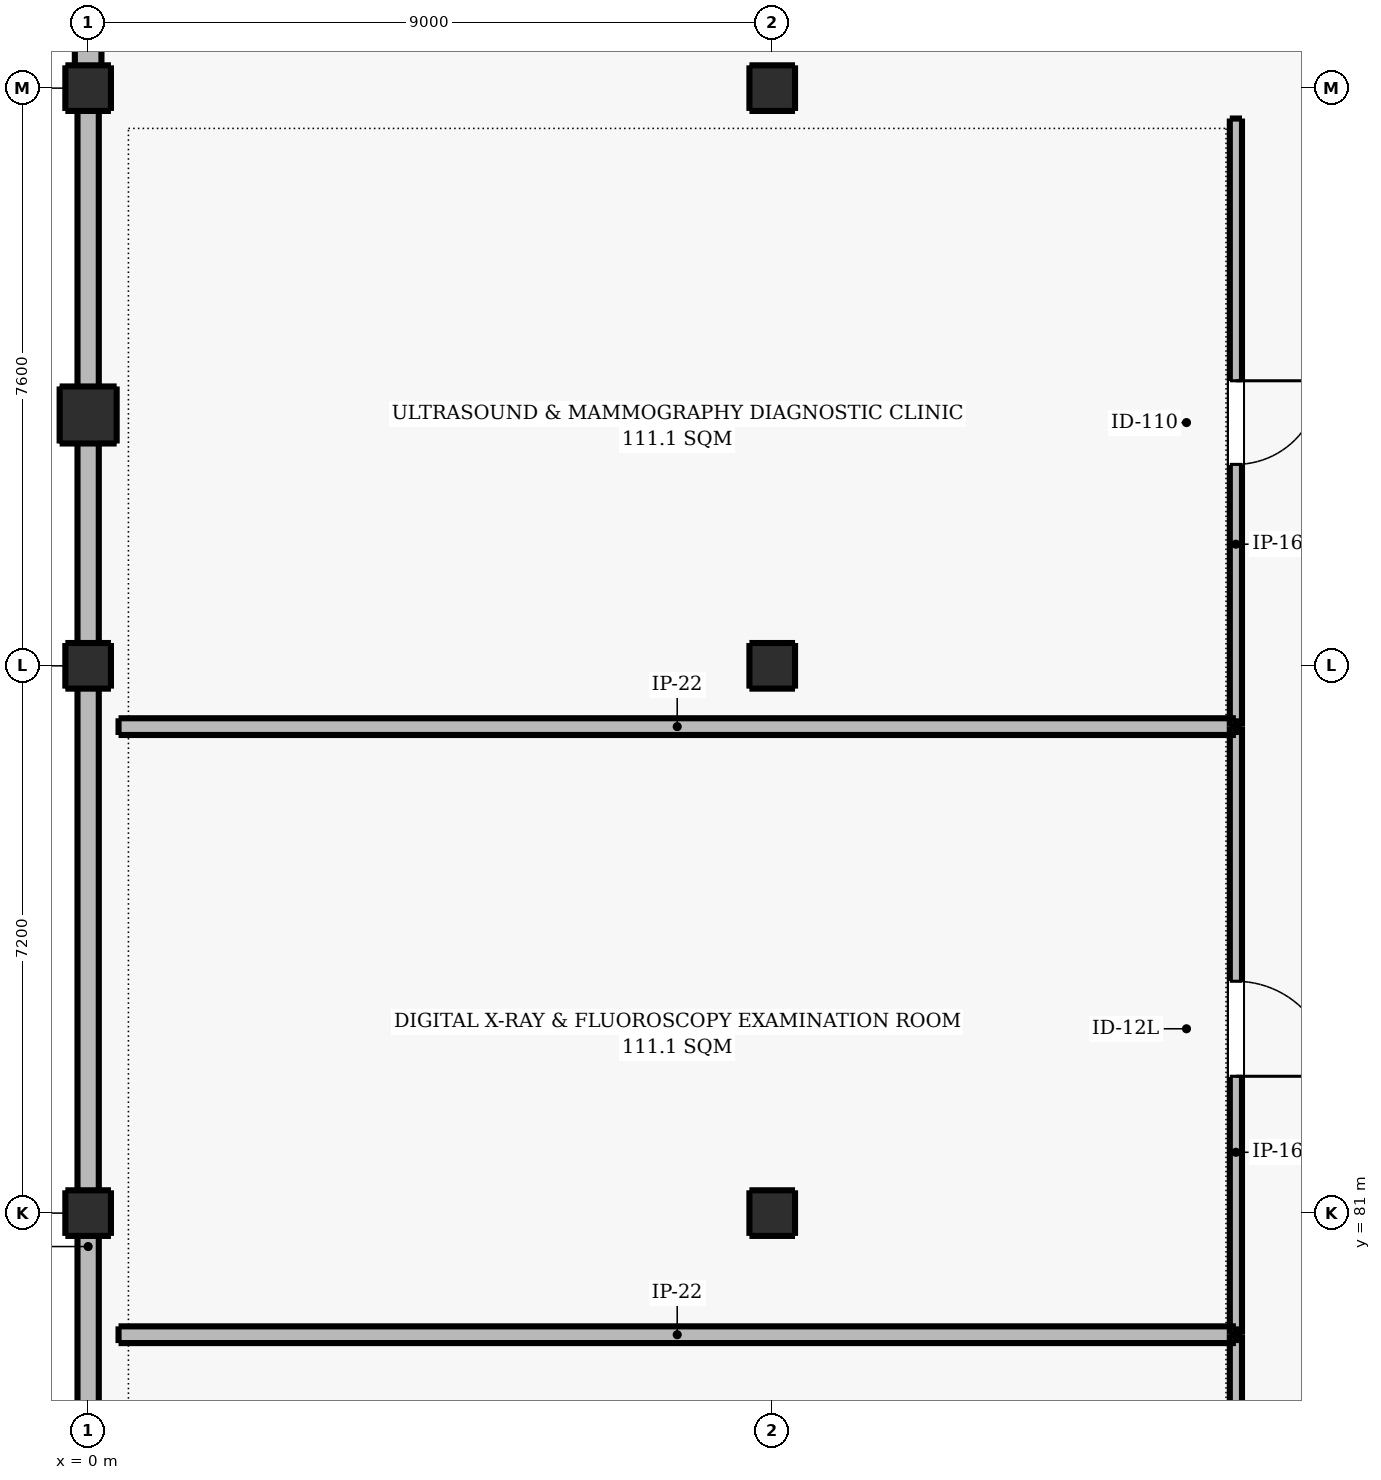
"""IFC4 building model, lengths in metres.
Left out: names, types, materials, properties, quantities, classifications, styles, units other than length and angle.
Written with IfcOpenShell. Run it as: python <this file> out.ifc"""

import sys

from ifc_helpers import new_model, si_unit, direction, frame, frame_2d, origin, origin_2d, place, context, subcontext, project, spatial, rectangle, extrude, element, fill, save


model = new_model("IFC4")
c1 = context("Model", 3, precision=1e-05, world=origin(), true_north=direction((0.0, 1.0)))
c2 = subcontext(c1, "Body", "Model", "MODEL_VIEW")
j1 = project(units=[si_unit("LENGTHUNIT", "METRE"), si_unit("PLANEANGLEUNIT", "RADIAN")], contexts=[c1])
p1 = place(None, origin())
s1 = spatial("IfcSite", under=j1, at=p1, CompositionType="ELEMENT")
p2 = place(p1, origin())
s2 = spatial("IfcBuilding", under=s1, at=p2, CompositionType="ELEMENT")
p3 = place(p2, origin())
s3 = spatial("IfcBuildingStorey", under=s2, at=p3, CompositionType="ELEMENT", Elevation=0.0)
for number, where, z_axis, x_axis in (
    (1, (0.0, 81.0, 0.0), (0.0, 0.0, 1.0), (1.0, 0.0, 0.0)),
    (2, (0.0, 88.2, 0.0), (0.0, 0.0, 1.0), (1.0, 0.0, 0.0)),
):
    element("IfcColumn", number, at=place(p3, frame(where, z_axis=z_axis, x_axis=x_axis)), inside=s3, PredefinedType="COLUMN", context=c2, shape_type="SweptSolid", body=[
        extrude(rectangle(XDim=0.6, YDim=0.6, at=origin_2d()), origin(), (0.0, 0.0, 1.0), 5.1),
    ])
p4 = place(p3, frame((0.0, 91.5, 0.0), z_axis=(0.0, 0.0, 1.0), x_axis=(1.0, 0.0, 0.0)))
e3 = element("IfcColumn", 3, at=p4, inside=s3, PredefinedType="PILASTER", context=c2, shape_type="SweptSolid", body=[
    extrude(rectangle(XDim=0.75, YDim=0.75, at=origin_2d()), origin(), (0.0, 0.0, 1.0), 5.1),
])
for number, where, z_axis, x_axis in (
    (4, (0.0, 95.8, 0.0), (0.0, 0.0, 1.0), (1.0, 0.0, 0.0)),
    (5, (9.0, 81.0, 0.0), (0.0, 0.0, 1.0), (1.0, 0.0, 0.0)),
    (6, (9.0, 88.2, 0.0), (0.0, 0.0, 1.0), (1.0, 0.0, 0.0)),
    (7, (9.0, 95.8, 0.0), (0.0, 0.0, 1.0), (1.0, 0.0, 0.0)),
):
    element("IfcColumn", number, at=place(p3, frame(where, z_axis=z_axis, x_axis=x_axis)), inside=s3, PredefinedType="COLUMN", context=c2, shape_type="SweptSolid", body=[
        extrude(rectangle(XDim=0.6, YDim=0.6, at=origin_2d()), origin(), (0.0, 0.0, 1.0), 5.1),
    ])
p5 = place(p3, frame((0.0, 45.0, 0.0), z_axis=(0.0, 0.0, 1.0), x_axis=(0.0, 1.0, 0.0)))
e8 = element("IfcWall", 8, at=p5, inside=s3, PredefinedType="SOLIDWALL", context=c2, shape_type="SweptSolid", body=[
    extrude(rectangle(XDim=50.8, YDim=0.28, at=frame_2d((25.4, 0.0))), origin(), (0.0, 0.0, 1.0), 4.16),
])
p6 = place(p5, frame((2.3, 0.0, 0.0)))
e9 = element("IfcOpeningElement", 9, at=p6, cuts=e8, PredefinedType="OPENING", context=c2, shape_type="SweptSolid", body=[
    extrude(rectangle(XDim=2.6, YDim=2.6, at=frame_2d((1.3, 1.3))), frame((0.0, 0.15, 0.0), z_axis=(0.0, -1.0, 0.0), x_axis=(1.0, 0.0, 0.0)), (0.0, 0.0, 1.0), 0.3),
])
p7 = place(p3, frame((0.0, 95.8, 0.0), z_axis=(0.0, 0.0, 1.0), x_axis=(0.0, 1.0, 0.0)))
e10 = element("IfcWall", 10, at=p7, inside=s3, PredefinedType="SOLIDWALL", context=c2, shape_type="SweptSolid", body=[
    extrude(rectangle(XDim=15.2, YDim=0.35, at=frame_2d((7.6, 0.0))), origin(), (0.0, 0.0, 1.0), 4.16),
])
p8 = place(p7, frame((0.8, 0.0, 0.0)))
e11 = element("IfcOpeningElement", 11, at=p8, cuts=e10, PredefinedType="OPENING", context=c2, shape_type="SweptSolid", body=[
    extrude(rectangle(XDim=2.4, YDim=2.5, at=frame_2d((1.2, 1.25))), frame((0.0, 0.185, 0.0), z_axis=(0.0, -1.0, 0.0), x_axis=(1.0, 0.0, 0.0)), (0.0, 0.0, 1.0), 0.37),
])
p9 = place(p7, frame((11.667, 0.0, 1.05)))
e12 = element("IfcOpeningElement", 12, at=p9, cuts=e10, PredefinedType="OPENING", context=c2, shape_type="SweptSolid", body=[
    extrude(rectangle(XDim=2.0, YDim=2.1, at=frame_2d((1.0, 1.05))), frame((0.0, 0.185, 0.0), z_axis=(0.0, -1.0, 0.0), x_axis=(1.0, 0.0, 0.0)), (0.0, 0.0, 1.0), 0.37),
])
p10 = place(p3, frame((15.1, 70.9, 0.0), z_axis=(0.0, 0.0, 1.0), x_axis=(0.0, 1.0, 0.0)))
e13 = element("IfcWall", 13, at=p10, inside=s3, PredefinedType="PARTITIONING", context=c2, shape_type="SweptSolid", body=[
    extrude(rectangle(XDim=8.5, YDim=0.16, at=frame_2d((4.25, 0.0))), origin(), (0.0, 0.0, 1.0), 4.49),
])
p11 = place(p10, frame((3.65, 0.0, 0.0)))
e14 = element("IfcOpeningElement", 14, at=p11, cuts=e13, PredefinedType="OPENING", context=c2, shape_type="SweptSolid", body=[
    extrude(rectangle(XDim=1.25, YDim=2.2, at=frame_2d((0.625, 1.1))), frame((0.0, 0.09, 0.0), z_axis=(0.0, -1.0, 0.0), x_axis=(1.0, 0.0, 0.0)), (0.0, 0.0, 1.0), 0.18),
])
p12 = place(p3, frame((0.4, 79.4, 0.0), z_axis=(0.0, 0.0, 1.0), x_axis=(1.0, 0.0, 0.0)))
e15 = element("IfcWall", 15, at=p12, inside=s3, PredefinedType="PARTITIONING", context=c2, shape_type="SweptSolid", body=[
    extrude(rectangle(XDim=14.7, YDim=0.22, at=frame_2d((7.35, 0.0))), origin(), (0.0, 0.0, 1.0), 4.82),
])
p13 = place(p3, frame((15.1, 79.4, 0.0), z_axis=(0.0, 0.0, 1.0), x_axis=(0.0, 1.0, 0.0)))
e16 = element("IfcWall", 16, at=p13, inside=s3, PredefinedType="PARTITIONING", context=c2, shape_type="SweptSolid", body=[
    extrude(rectangle(XDim=8.0, YDim=0.16, at=frame_2d((4.0, 0.0))), origin(), (0.0, 0.0, 1.0), 4.36),
])
p14 = place(p13, frame((3.4, 0.0, 0.0)))
e17 = element("IfcOpeningElement", 17, at=p14, cuts=e16, PredefinedType="OPENING", context=c2, shape_type="SweptSolid", body=[
    extrude(rectangle(XDim=1.25, YDim=2.2, at=frame_2d((0.625, 1.1))), frame((0.0, 0.09, 0.0), z_axis=(0.0, -1.0, 0.0), x_axis=(1.0, 0.0, 0.0)), (0.0, 0.0, 1.0), 0.18),
])
p15 = place(p3, frame((0.4, 87.4, 0.0), z_axis=(0.0, 0.0, 1.0), x_axis=(1.0, 0.0, 0.0)))
e18 = element("IfcWall", 18, at=p15, inside=s3, PredefinedType="PARTITIONING", context=c2, shape_type="SweptSolid", body=[
    extrude(rectangle(XDim=14.7, YDim=0.22, at=frame_2d((7.35, 0.0))), origin(), (0.0, 0.0, 1.0), 4.82),
])
p16 = place(p3, frame((15.1, 87.4, 0.0), z_axis=(0.0, 0.0, 1.0), x_axis=(0.0, 1.0, 0.0)))
e19 = element("IfcWall", 19, at=p16, inside=s3, PredefinedType="PARTITIONING", context=c2, shape_type="SweptSolid", body=[
    extrude(rectangle(XDim=8.0, YDim=0.16, at=frame_2d((4.0, 0.0))), origin(), (0.0, 0.0, 1.0), 4.36),
])
p17 = place(p16, frame((3.45, 0.0, 0.0)))
e20 = element("IfcOpeningElement", 20, at=p17, cuts=e19, PredefinedType="OPENING", context=c2, shape_type="SweptSolid", body=[
    extrude(rectangle(XDim=1.1, YDim=2.15, at=frame_2d((0.55, 1.075))), frame((0.0, 0.09, 0.0), z_axis=(0.0, -1.0, 0.0), x_axis=(1.0, 0.0, 0.0)), (0.0, 0.0, 1.0), 0.18),
])
p18 = place(p14, frame((1.25, 0.0, 0.0), z_axis=(0.0, 0.0, 1.0), x_axis=(-1.0, 0.0, 0.0)))
e21 = element("IfcDoor", 21, at=p18, inside=s3, OperationType="SINGLE_SWING_LEFT", PredefinedType="DOOR", context=c2, shape_type="SweptSolid", body=[
    extrude(rectangle(XDim=1.25, YDim=2.2, at=frame_2d((0.625, 1.1))), frame((0.0, 0.025, 0.0), z_axis=(0.0, -1.0, 0.0), x_axis=(1.0, 0.0, 0.0)), (0.0, 0.0, 1.0), 0.05),
])
fill(e17, e21)
p19 = place(p17, frame((1.1, 0.0, 0.0), z_axis=(0.0, 0.0, 1.0), x_axis=(-1.0, 0.0, 0.0)))
e22 = element("IfcDoor", 22, at=p19, inside=s3, OperationType="SINGLE_SWING_RIGHT", PredefinedType="DOOR", context=c2, shape_type="SweptSolid", body=[
    extrude(rectangle(XDim=1.1, YDim=2.15, at=frame_2d((0.55, 1.075))), frame((0.0, 0.025, 0.0), z_axis=(0.0, -1.0, 0.0), x_axis=(1.0, 0.0, 0.0)), (0.0, 0.0, 1.0), 0.05),
])
fill(e20, e22)
save(model, sys.argv[1])
